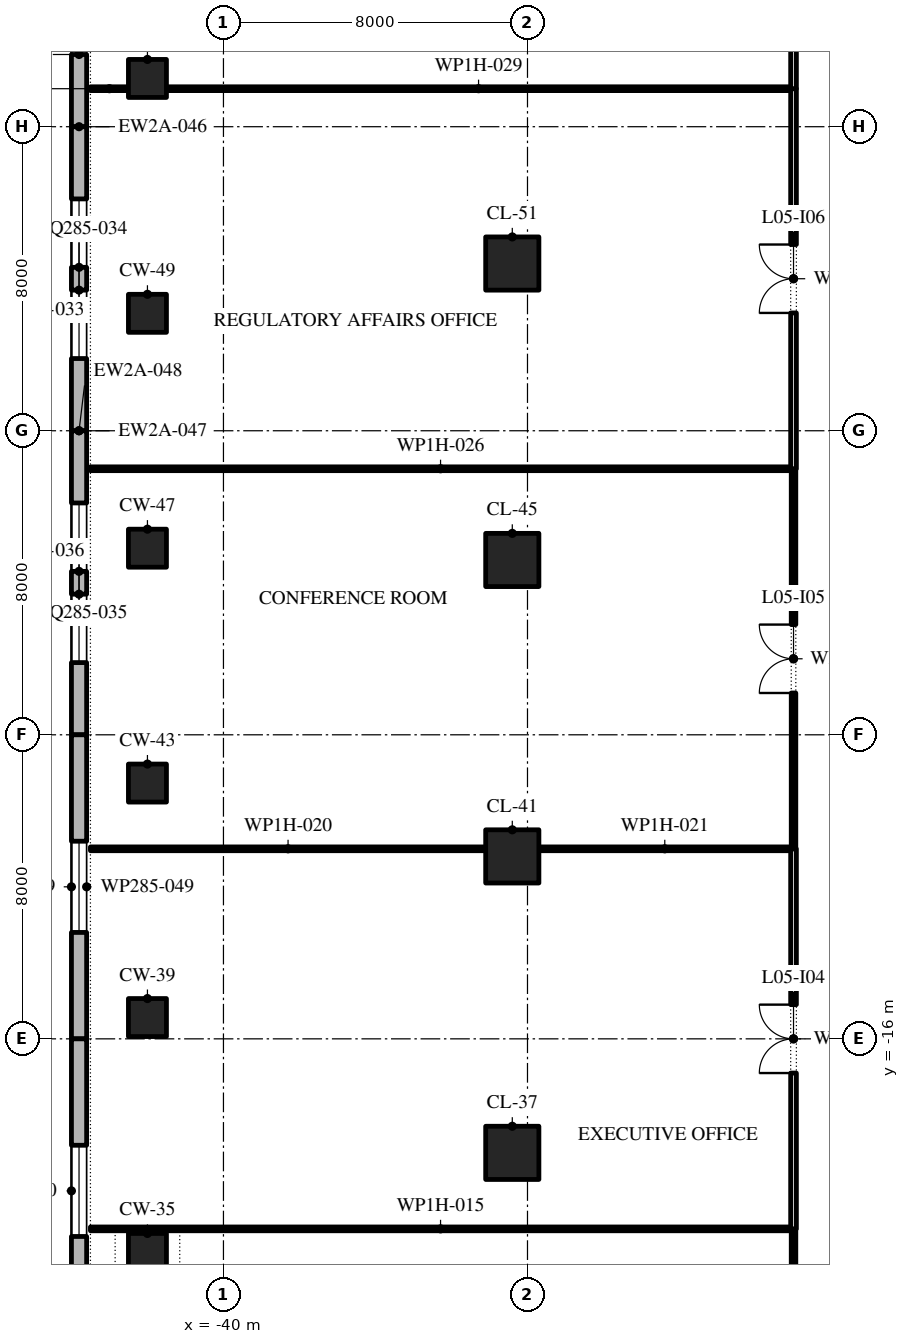
"""IFC4 building model, lengths in metres.
Left out: names, types, materials, properties, quantities, classifications, styles, units other than length and angle.
Written with IfcOpenShell. Run it as: python <this file> out.ifc"""

import sys

from ifc_helpers import new_model, si_unit, direction, frame, frame_2d, origin, origin_2d, place, context, subcontext, project, spatial, polyline, rectangle, outline, extrude, element, fill, save


model = new_model("IFC4")
c1 = context("Model", 3, precision=1e-05, world=origin(), true_north=direction((0.0, 1.0)))
c2 = subcontext(c1, "Body", "Model", "MODEL_VIEW")
j1 = project(units=[si_unit("LENGTHUNIT", "METRE"), si_unit("PLANEANGLEUNIT", "RADIAN")], contexts=[c1])
p1 = place(None, origin())
s1 = spatial("IfcSite", under=j1, at=p1, CompositionType="ELEMENT")
p2 = place(p1, origin())
s2 = spatial("IfcBuilding", under=s1, at=p2, CompositionType="ELEMENT")
p3 = place(p2, frame((0.0, 0.0, 28.8)))
s3 = spatial("IfcBuildingStorey", under=s2, at=p3, CompositionType="ELEMENT", Elevation=28.8)
p4 = place(p3, frame((-42.0, -21.62, 0.0), z_axis=(0.0, 0.0, 1.0), x_axis=(1.0, 0.0, 0.0)))
e1 = element("IfcColumn", 1, at=p4, inside=s3, PredefinedType="COLUMN", context=c2, shape_type="SweptSolid", body=[
    extrude(rectangle(XDim=1.0, YDim=1.0, at=origin_2d()), origin(), (0.0, 0.0, 1.0), 4.35),
])
p5 = place(p3, frame((-32.4, -19.0, 0.0), z_axis=(0.0, 0.0, 1.0), x_axis=(1.0, 0.0, 0.0)))
e2 = element("IfcColumn", 2, at=p5, inside=s3, PredefinedType="COLUMN", context=c2, shape_type="SweptSolid", body=[
    extrude(rectangle(XDim=1.4, YDim=1.4, at=origin_2d()), origin(), (0.0, 0.0, 1.0), 4.8),
])
p6 = place(p3, frame((-42.0, -15.44, 0.0), z_axis=(0.0, 0.0, 1.0), x_axis=(1.0, 0.0, 0.0)))
e3 = element("IfcColumn", 3, at=p6, inside=s3, PredefinedType="COLUMN", context=c2, shape_type="SweptSolid", body=[
    extrude(rectangle(XDim=1.0, YDim=1.0, at=origin_2d()), origin(), (0.0, 0.0, 1.0), 4.35),
])
p7 = place(p3, frame((-32.4, -11.2, 0.0), z_axis=(0.0, 0.0, 1.0), x_axis=(1.0, 0.0, 0.0)))
e4 = element("IfcColumn", 4, at=p7, inside=s3, PredefinedType="COLUMN", context=c2, shape_type="SweptSolid", body=[
    extrude(rectangle(XDim=1.4, YDim=1.4, at=origin_2d()), origin(), (0.0, 0.0, 1.0), 4.8),
])
p8 = place(p3, frame((-42.0, -9.27, 0.0), z_axis=(0.0, 0.0, 1.0), x_axis=(1.0, 0.0, 0.0)))
e5 = element("IfcColumn", 5, at=p8, inside=s3, PredefinedType="COLUMN", context=c2, shape_type="SweptSolid", body=[
    extrude(rectangle(XDim=1.0, YDim=1.0, at=origin_2d()), origin(), (0.0, 0.0, 1.0), 4.35),
])
p9 = place(p3, frame((-32.4, -3.4, 0.0), z_axis=(0.0, 0.0, 1.0), x_axis=(1.0, 0.0, 0.0)))
e6 = element("IfcColumn", 6, at=p9, inside=s3, PredefinedType="COLUMN", context=c2, shape_type="SweptSolid", body=[
    extrude(rectangle(XDim=1.4, YDim=1.4, at=origin_2d()), origin(), (0.0, 0.0, 1.0), 4.8),
])
for number, where, z_axis, x_axis in (
    (7, (-42.0, -3.09, 0.0), (0.0, 0.0, 1.0), (1.0, 0.0, 0.0)),
    (8, (-42.0, 3.09, 0.0), (0.0, 0.0, 1.0), (1.0, 0.0, 0.0)),
):
    element("IfcColumn", number, at=place(p3, frame(where, z_axis=z_axis, x_axis=x_axis)), inside=s3, PredefinedType="COLUMN", context=c2, shape_type="SweptSolid", body=[
        extrude(rectangle(XDim=1.0, YDim=1.0, at=origin_2d()), origin(), (0.0, 0.0, 1.0), 4.35),
    ])
p10 = place(p3, frame((-32.4, 4.4, 0.0), z_axis=(0.0, 0.0, 1.0), x_axis=(1.0, 0.0, 0.0)))
e9 = element("IfcColumn", 9, at=p10, inside=s3, PredefinedType="COLUMN", context=c2, shape_type="SweptSolid", body=[
    extrude(rectangle(XDim=1.4, YDim=1.4, at=origin_2d()), origin(), (0.0, 0.0, 1.0), 4.8),
])
p11 = place(p3, frame((-42.0, 9.27, 0.0), z_axis=(0.0, 0.0, 1.0), x_axis=(1.0, 0.0, 0.0)))
e10 = element("IfcColumn", 10, at=p11, inside=s3, PredefinedType="COLUMN", context=c2, shape_type="SweptSolid", body=[
    extrude(rectangle(XDim=1.0, YDim=1.0, at=origin_2d()), origin(), (0.0, 0.0, 1.0), 4.35),
])
p12 = place(p3, frame((-43.8, 16.0, 0.0), z_axis=(0.0, 0.0, 1.0), x_axis=(0.0, -1.0, 0.0)))
e11 = element("IfcWall", 11, at=p12, inside=s3, PredefinedType="STANDARD", context=c2, shape_type="SweptSolid", body=[
    extrude(rectangle(XDim=8.0, YDim=0.4, at=frame_2d((4.0, 0.0))), origin(), (0.0, 0.0, 1.0), 4.35),
])
p13 = place(p12, frame((1.9, 0.0, 0.9)))
e12 = element("IfcOpeningElement", 12, at=p13, cuts=e11, PredefinedType="OPENING", context=c2, shape_type="SweptSolid", body=[
    extrude(outline(polyline([(0.0, 0.0), (1.8, 0.0), (1.8, 1.425), (1.784, 1.646), (1.738, 1.864), (1.661, 2.072), (1.556, 2.268), (1.425, 2.447), (1.269, 2.605), (1.093, 2.741), (0.9, 2.85), (0.707, 2.741), (0.531, 2.605), (0.375, 2.447), (0.244, 2.268), (0.139, 2.072), (0.062, 1.864), (0.016, 1.646), (0.0, 1.425), (0.0, 0.0)])), frame((0.0, 0.21, 0.0), z_axis=(0.0, -1.0, 0.0), x_axis=(1.0, 0.0, 0.0)), (0.0, 0.0, 1.0), 0.42),
])
p14 = place(p12, frame((4.3, 0.0, 0.9)))
e13 = element("IfcOpeningElement", 13, at=p14, cuts=e11, PredefinedType="OPENING", context=c2, shape_type="SweptSolid", body=[
    extrude(outline(polyline([(0.0, 0.0), (1.8, 0.0), (1.8, 1.425), (1.784, 1.646), (1.738, 1.864), (1.661, 2.072), (1.556, 2.268), (1.425, 2.447), (1.269, 2.605), (1.093, 2.741), (0.9, 2.85), (0.707, 2.741), (0.531, 2.605), (0.375, 2.447), (0.244, 2.268), (0.139, 2.072), (0.062, 1.864), (0.016, 1.646), (0.0, 1.425), (0.0, 0.0)])), frame((0.0, 0.21, 0.0), z_axis=(0.0, -1.0, 0.0), x_axis=(1.0, 0.0, 0.0)), (0.0, 0.0, 1.0), 0.42),
])
p15 = place(p3, frame((-43.8, 8.0, 0.0), z_axis=(0.0, 0.0, 1.0), x_axis=(0.0, -1.0, 0.0)))
e14 = element("IfcWall", 14, at=p15, inside=s3, PredefinedType="STANDARD", context=c2, shape_type="SweptSolid", body=[
    extrude(rectangle(XDim=8.0, YDim=0.4, at=frame_2d((4.0, 0.0))), origin(), (0.0, 0.0, 1.0), 4.35),
])
p16 = place(p15, frame((1.9, 0.0, 0.9)))
e15 = element("IfcOpeningElement", 15, at=p16, cuts=e14, PredefinedType="OPENING", context=c2, shape_type="SweptSolid", body=[
    extrude(outline(polyline([(0.0, 0.0), (1.8, 0.0), (1.8, 1.425), (1.784, 1.646), (1.738, 1.864), (1.661, 2.072), (1.556, 2.268), (1.425, 2.447), (1.269, 2.605), (1.093, 2.741), (0.9, 2.85), (0.707, 2.741), (0.531, 2.605), (0.375, 2.447), (0.244, 2.268), (0.139, 2.072), (0.062, 1.864), (0.016, 1.646), (0.0, 1.425), (0.0, 0.0)])), frame((0.0, 0.21, 0.0), z_axis=(0.0, -1.0, 0.0), x_axis=(1.0, 0.0, 0.0)), (0.0, 0.0, 1.0), 0.42),
])
p17 = place(p15, frame((4.3, 0.0, 0.9)))
e16 = element("IfcOpeningElement", 16, at=p17, cuts=e14, PredefinedType="OPENING", context=c2, shape_type="SweptSolid", body=[
    extrude(outline(polyline([(0.0, 0.0), (1.8, 0.0), (1.8, 1.425), (1.784, 1.646), (1.738, 1.864), (1.661, 2.072), (1.556, 2.268), (1.425, 2.447), (1.269, 2.605), (1.093, 2.741), (0.9, 2.85), (0.707, 2.741), (0.531, 2.605), (0.375, 2.447), (0.244, 2.268), (0.139, 2.072), (0.062, 1.864), (0.016, 1.646), (0.0, 1.425), (0.0, 0.0)])), frame((0.0, 0.21, 0.0), z_axis=(0.0, -1.0, 0.0), x_axis=(1.0, 0.0, 0.0)), (0.0, 0.0, 1.0), 0.42),
])
p18 = place(p3, frame((-43.8, 0.0, 0.0), z_axis=(0.0, 0.0, 1.0), x_axis=(0.0, -1.0, 0.0)))
e17 = element("IfcWall", 17, at=p18, inside=s3, PredefinedType="STANDARD", context=c2, shape_type="SweptSolid", body=[
    extrude(rectangle(XDim=8.0, YDim=0.4, at=frame_2d((4.0, 0.0))), origin(), (0.0, 0.0, 1.0), 4.35),
])
p19 = place(p18, frame((1.9, 0.0, 0.9)))
e18 = element("IfcOpeningElement", 18, at=p19, cuts=e17, PredefinedType="OPENING", context=c2, shape_type="SweptSolid", body=[
    extrude(outline(polyline([(0.0, 0.0), (1.8, 0.0), (1.8, 1.425), (1.784, 1.646), (1.738, 1.864), (1.661, 2.072), (1.556, 2.268), (1.425, 2.447), (1.269, 2.605), (1.093, 2.741), (0.9, 2.85), (0.707, 2.741), (0.531, 2.605), (0.375, 2.447), (0.244, 2.268), (0.139, 2.072), (0.062, 1.864), (0.016, 1.646), (0.0, 1.425), (0.0, 0.0)])), frame((0.0, 0.21, 0.0), z_axis=(0.0, -1.0, 0.0), x_axis=(1.0, 0.0, 0.0)), (0.0, 0.0, 1.0), 0.42),
])
p20 = place(p18, frame((4.3, 0.0, 0.9)))
e19 = element("IfcOpeningElement", 19, at=p20, cuts=e17, PredefinedType="OPENING", context=c2, shape_type="SweptSolid", body=[
    extrude(outline(polyline([(0.0, 0.0), (1.8, 0.0), (1.8, 1.425), (1.784, 1.646), (1.738, 1.864), (1.661, 2.072), (1.556, 2.268), (1.425, 2.447), (1.269, 2.605), (1.093, 2.741), (0.9, 2.85), (0.707, 2.741), (0.531, 2.605), (0.375, 2.447), (0.244, 2.268), (0.139, 2.072), (0.062, 1.864), (0.016, 1.646), (0.0, 1.425), (0.0, 0.0)])), frame((0.0, 0.21, 0.0), z_axis=(0.0, -1.0, 0.0), x_axis=(1.0, 0.0, 0.0)), (0.0, 0.0, 1.0), 0.42),
])
p21 = place(p3, frame((-43.8, -8.0, 0.0), z_axis=(0.0, 0.0, 1.0), x_axis=(0.0, -1.0, 0.0)))
e20 = element("IfcWall", 20, at=p21, inside=s3, PredefinedType="STANDARD", context=c2, shape_type="SweptSolid", body=[
    extrude(rectangle(XDim=8.0, YDim=0.4, at=frame_2d((4.0, 0.0))), origin(), (0.0, 0.0, 1.0), 4.35),
])
p22 = place(p21, frame((2.8, 0.0, 0.9)))
e21 = element("IfcOpeningElement", 21, at=p22, cuts=e20, PredefinedType="OPENING", context=c2, shape_type="SweptSolid", body=[
    extrude(outline(polyline([(0.0, 0.0), (2.4, 0.0), (2.4, 1.425), (2.378, 1.677), (2.312, 1.921), (2.205, 2.15), (2.06, 2.356), (1.881, 2.535), (1.674, 2.679), (1.444, 2.785), (1.2, 2.85), (0.956, 2.785), (0.726, 2.679), (0.519, 2.535), (0.34, 2.356), (0.195, 2.15), (0.088, 1.921), (0.022, 1.677), (0.0, 1.425), (0.0, 0.0)])), frame((0.0, 0.21, 0.0), z_axis=(0.0, -1.0, 0.0), x_axis=(1.0, 0.0, 0.0)), (0.0, 0.0, 1.0), 0.42),
])
p23 = place(p3, frame((-43.8, -16.0, 0.0), z_axis=(0.0, 0.0, 1.0), x_axis=(0.0, -1.0, 0.0)))
e22 = element("IfcWall", 22, at=p23, inside=s3, PredefinedType="STANDARD", context=c2, shape_type="SweptSolid", body=[
    extrude(rectangle(XDim=8.0, YDim=0.4, at=frame_2d((4.0, 0.0))), origin(), (0.0, 0.0, 1.0), 4.35),
])
p24 = place(p23, frame((2.8, 0.0, 0.9)))
e23 = element("IfcOpeningElement", 23, at=p24, cuts=e22, PredefinedType="OPENING", context=c2, shape_type="SweptSolid", body=[
    extrude(outline(polyline([(0.0, 0.0), (2.4, 0.0), (2.4, 1.425), (2.378, 1.677), (2.312, 1.921), (2.205, 2.15), (2.06, 2.356), (1.881, 2.535), (1.674, 2.679), (1.444, 2.785), (1.2, 2.85), (0.956, 2.785), (0.726, 2.679), (0.519, 2.535), (0.34, 2.356), (0.195, 2.15), (0.088, 1.921), (0.022, 1.677), (0.0, 1.425), (0.0, 0.0)])), frame((0.0, 0.21, 0.0), z_axis=(0.0, -1.0, 0.0), x_axis=(1.0, 0.0, 0.0)), (0.0, 0.0, 1.0), 0.42),
])
p25 = place(p3, frame((-43.5, -21.0, 0.0), z_axis=(0.0, 0.0, 1.0), x_axis=(1.0, 0.0, 0.0)))
e24 = element("IfcWall", 24, at=p25, inside=s3, PredefinedType="PARTITIONING", context=c2, shape_type="SweptSolid", body=[
    extrude(rectangle(XDim=18.425, YDim=0.1, at=frame_2d((9.212, 0.0))), origin(), (0.0, 0.0, 1.0), 4.35),
])
p26 = place(p3, frame((-43.5, -11.0, 0.0), z_axis=(0.0, 0.0, 1.0), x_axis=(1.0, 0.0, 0.0)))
e25 = element("IfcWall", 25, at=p26, inside=s3, PredefinedType="PARTITIONING", context=c2, shape_type="SweptSolid", body=[
    extrude(rectangle(XDim=10.4, YDim=0.1, at=frame_2d((5.2, 0.0))), origin(), (0.0, 0.0, 1.0), 4.35),
])
p27 = place(p3, frame((-31.7, -11.0, 0.0), z_axis=(0.0, 0.0, 1.0), x_axis=(1.0, 0.0, 0.0)))
e26 = element("IfcWall", 26, at=p27, inside=s3, PredefinedType="PARTITIONING", context=c2, shape_type="SweptSolid", body=[
    extrude(rectangle(XDim=6.625, YDim=0.1, at=frame_2d((3.312, 0.0))), origin(), (0.0, 0.0, 1.0), 4.35),
])
p28 = place(p3, frame((-43.5, -1.0, 0.0), z_axis=(0.0, 0.0, 1.0), x_axis=(1.0, 0.0, 0.0)))
e27 = element("IfcWall", 27, at=p28, inside=s3, PredefinedType="PARTITIONING", context=c2, shape_type="SweptSolid", body=[
    extrude(rectangle(XDim=18.425, YDim=0.1, at=frame_2d((9.212, 0.0))), origin(), (0.0, 0.0, 1.0), 4.35),
])
p29 = place(p3, frame((-43.5, 9.0, 0.0), z_axis=(0.0, 0.0, 1.0), x_axis=(1.0, 0.0, 0.0)))
e28 = element("IfcWall", 28, at=p29, inside=s3, PredefinedType="PARTITIONING", context=c2, shape_type="SweptSolid", body=[
    extrude(rectangle(XDim=1.0, YDim=0.1, at=frame_2d((0.5, 0.0))), origin(), (0.0, 0.0, 1.0), 4.35),
])
p30 = place(p3, frame((-41.5, 9.0, 0.0), z_axis=(0.0, 0.0, 1.0), x_axis=(1.0, 0.0, 0.0)))
e29 = element("IfcWall", 29, at=p30, inside=s3, PredefinedType="PARTITIONING", context=c2, shape_type="SweptSolid", body=[
    extrude(rectangle(XDim=16.425, YDim=0.1, at=frame_2d((8.212, 0.0))), origin(), (0.0, 0.0, 1.0), 4.35),
])
p31 = place(p3, frame((-25.0, -28.56, 0.0), z_axis=(0.0, 0.0, 1.0), x_axis=(0.0, 1.0, 0.0)))
e30 = element("IfcWall", 30, at=p31, inside=s3, PredefinedType="PARTITIONING", context=c2, shape_type="SweptSolid", body=[
    extrude(rectangle(XDim=7.56, YDim=0.12, at=frame_2d((3.78, 0.0))), origin(), (0.0, 0.0, 1.0), 4.35),
])
p32 = place(p31, frame((3.28, 0.0, 0.0)))
e31 = element("IfcOpeningElement", 31, at=p32, cuts=e30, PredefinedType="OPENING", context=c2, shape_type="SweptSolid", body=[
    extrude(rectangle(XDim=1.0, YDim=2.1, at=frame_2d((0.5, 1.05))), frame((0.0, 0.07, 0.0), z_axis=(0.0, -1.0, 0.0), x_axis=(1.0, 0.0, 0.0)), (0.0, 0.0, 1.0), 0.14),
])
p33 = place(p3, frame((-25.0, -21.0, 0.0), z_axis=(0.0, 0.0, 1.0), x_axis=(0.0, 1.0, 0.0)))
e32 = element("IfcWall", 32, at=p33, inside=s3, PredefinedType="PARTITIONING", context=c2, shape_type="SweptSolid", body=[
    extrude(rectangle(XDim=10.0, YDim=0.15, at=frame_2d((5.0, 0.0))), origin(), (0.0, 0.0, 1.0), 4.35),
])
p34 = place(p33, frame((4.1, 0.0, 0.0)))
e33 = element("IfcOpeningElement", 33, at=p34, cuts=e32, PredefinedType="OPENING", context=c2, shape_type="SweptSolid", body=[
    extrude(rectangle(XDim=1.8, YDim=2.1, at=frame_2d((0.9, 1.05))), frame((0.0, 0.085, 0.0), z_axis=(0.0, -1.0, 0.0), x_axis=(1.0, 0.0, 0.0)), (0.0, 0.0, 1.0), 0.17),
])
p35 = place(p3, frame((-25.0, -11.0, 0.0), z_axis=(0.0, 0.0, 1.0), x_axis=(0.0, 1.0, 0.0)))
e34 = element("IfcWall", 34, at=p35, inside=s3, PredefinedType="PARTITIONING", context=c2, shape_type="SweptSolid", body=[
    extrude(rectangle(XDim=10.0, YDim=0.12, at=frame_2d((5.0, 0.0))), origin(), (0.0, 0.0, 1.0), 4.35),
])
p36 = place(p35, frame((4.1, 0.0, 0.0)))
e35 = element("IfcOpeningElement", 35, at=p36, cuts=e34, PredefinedType="OPENING", context=c2, shape_type="SweptSolid", body=[
    extrude(rectangle(XDim=1.8, YDim=2.1, at=frame_2d((0.9, 1.05))), frame((0.0, 0.07, 0.0), z_axis=(0.0, -1.0, 0.0), x_axis=(1.0, 0.0, 0.0)), (0.0, 0.0, 1.0), 0.14),
])
p37 = place(p3, frame((-25.0, -1.0, 0.0), z_axis=(0.0, 0.0, 1.0), x_axis=(0.0, 1.0, 0.0)))
e36 = element("IfcWall", 36, at=p37, inside=s3, PredefinedType="PARTITIONING", context=c2, shape_type="SweptSolid", body=[
    extrude(rectangle(XDim=10.0, YDim=0.15, at=frame_2d((5.0, 0.0))), origin(), (0.0, 0.0, 1.0), 4.35),
])
p38 = place(p37, frame((4.1, 0.0, 0.0)))
e37 = element("IfcOpeningElement", 37, at=p38, cuts=e36, PredefinedType="OPENING", context=c2, shape_type="SweptSolid", body=[
    extrude(rectangle(XDim=1.8, YDim=2.1, at=frame_2d((0.9, 1.05))), frame((0.0, 0.085, 0.0), z_axis=(0.0, -1.0, 0.0), x_axis=(1.0, 0.0, 0.0)), (0.0, 0.0, 1.0), 0.17),
])
p39 = place(p3, frame((-25.0, 9.0, 0.0), z_axis=(0.0, 0.0, 1.0), x_axis=(0.0, 1.0, 0.0)))
e38 = element("IfcWall", 38, at=p39, inside=s3, PredefinedType="PARTITIONING", context=c2, shape_type="SweptSolid", body=[
    extrude(rectangle(XDim=9.0, YDim=0.15, at=frame_2d((4.5, 0.0))), origin(), (0.0, 0.0, 1.0), 4.35),
])
p40 = place(p39, frame((3.6, 0.0, 0.0)))
e39 = element("IfcOpeningElement", 39, at=p40, cuts=e38, PredefinedType="OPENING", context=c2, shape_type="SweptSolid", body=[
    extrude(rectangle(XDim=1.8, YDim=2.1, at=frame_2d((0.9, 1.05))), frame((0.0, 0.085, 0.0), z_axis=(0.0, -1.0, 0.0), x_axis=(1.0, 0.0, 0.0)), (0.0, 0.0, 1.0), 0.17),
])
p41 = place(p14, origin())
e40 = element("IfcWindow", 40, at=p41, inside=s3, PartitioningType="DOUBLE_PANEL_VERTICAL", PredefinedType="WINDOW", context=c2, shape_type="SweptSolid", body=[
    extrude(outline(polyline([(0.0, 0.0), (1.8, 0.0), (1.8, 1.425), (1.784, 1.646), (1.738, 1.864), (1.661, 2.072), (1.556, 2.268), (1.425, 2.447), (1.269, 2.605), (1.093, 2.741), (0.9, 2.85), (0.707, 2.741), (0.531, 2.605), (0.375, 2.447), (0.244, 2.268), (0.139, 2.072), (0.062, 1.864), (0.016, 1.646), (0.0, 1.425), (0.0, 0.0)])), frame((0.0, 0.03, 0.0), z_axis=(0.0, -1.0, 0.0), x_axis=(1.0, 0.0, 0.0)), (0.0, 0.0, 1.0), 0.06),
])
fill(e13, e40)
p42 = place(p16, origin())
e41 = element("IfcWindow", 41, at=p42, inside=s3, PartitioningType="DOUBLE_PANEL_VERTICAL", PredefinedType="WINDOW", context=c2, shape_type="SweptSolid", body=[
    extrude(outline(polyline([(0.0, 0.0), (1.8, 0.0), (1.8, 1.425), (1.784, 1.646), (1.738, 1.864), (1.661, 2.072), (1.556, 2.268), (1.425, 2.447), (1.269, 2.605), (1.093, 2.741), (0.9, 2.85), (0.707, 2.741), (0.531, 2.605), (0.375, 2.447), (0.244, 2.268), (0.139, 2.072), (0.062, 1.864), (0.016, 1.646), (0.0, 1.425), (0.0, 0.0)])), frame((0.0, 0.03, 0.0), z_axis=(0.0, -1.0, 0.0), x_axis=(1.0, 0.0, 0.0)), (0.0, 0.0, 1.0), 0.06),
])
fill(e15, e41)
p43 = place(p17, origin())
e42 = element("IfcWindow", 42, at=p43, inside=s3, PartitioningType="DOUBLE_PANEL_VERTICAL", PredefinedType="WINDOW", context=c2, shape_type="SweptSolid", body=[
    extrude(outline(polyline([(0.0, 0.0), (1.8, 0.0), (1.8, 1.425), (1.784, 1.646), (1.738, 1.864), (1.661, 2.072), (1.556, 2.268), (1.425, 2.447), (1.269, 2.605), (1.093, 2.741), (0.9, 2.85), (0.707, 2.741), (0.531, 2.605), (0.375, 2.447), (0.244, 2.268), (0.139, 2.072), (0.062, 1.864), (0.016, 1.646), (0.0, 1.425), (0.0, 0.0)])), frame((0.0, 0.03, 0.0), z_axis=(0.0, -1.0, 0.0), x_axis=(1.0, 0.0, 0.0)), (0.0, 0.0, 1.0), 0.06),
])
fill(e16, e42)
p44 = place(p19, origin())
e43 = element("IfcWindow", 43, at=p44, inside=s3, PartitioningType="DOUBLE_PANEL_VERTICAL", PredefinedType="WINDOW", context=c2, shape_type="SweptSolid", body=[
    extrude(outline(polyline([(0.0, 0.0), (1.8, 0.0), (1.8, 1.425), (1.784, 1.646), (1.738, 1.864), (1.661, 2.072), (1.556, 2.268), (1.425, 2.447), (1.269, 2.605), (1.093, 2.741), (0.9, 2.85), (0.707, 2.741), (0.531, 2.605), (0.375, 2.447), (0.244, 2.268), (0.139, 2.072), (0.062, 1.864), (0.016, 1.646), (0.0, 1.425), (0.0, 0.0)])), frame((0.0, 0.03, 0.0), z_axis=(0.0, -1.0, 0.0), x_axis=(1.0, 0.0, 0.0)), (0.0, 0.0, 1.0), 0.06),
])
fill(e18, e43)
p45 = place(p20, origin())
e44 = element("IfcWindow", 44, at=p45, inside=s3, PartitioningType="DOUBLE_PANEL_VERTICAL", PredefinedType="WINDOW", context=c2, shape_type="SweptSolid", body=[
    extrude(outline(polyline([(0.0, 0.0), (1.8, 0.0), (1.8, 1.425), (1.784, 1.646), (1.738, 1.864), (1.661, 2.072), (1.556, 2.268), (1.425, 2.447), (1.269, 2.605), (1.093, 2.741), (0.9, 2.85), (0.707, 2.741), (0.531, 2.605), (0.375, 2.447), (0.244, 2.268), (0.139, 2.072), (0.062, 1.864), (0.016, 1.646), (0.0, 1.425), (0.0, 0.0)])), frame((0.0, 0.03, 0.0), z_axis=(0.0, -1.0, 0.0), x_axis=(1.0, 0.0, 0.0)), (0.0, 0.0, 1.0), 0.06),
])
fill(e19, e44)
p46 = place(p22, origin())
e45 = element("IfcWindow", 45, at=p46, inside=s3, PartitioningType="DOUBLE_PANEL_VERTICAL", PredefinedType="WINDOW", context=c2, shape_type="SweptSolid", body=[
    extrude(outline(polyline([(0.0, 0.0), (2.4, 0.0), (2.4, 1.425), (2.378, 1.677), (2.312, 1.921), (2.205, 2.15), (2.06, 2.356), (1.881, 2.535), (1.674, 2.679), (1.444, 2.785), (1.2, 2.85), (0.956, 2.785), (0.726, 2.679), (0.519, 2.535), (0.34, 2.356), (0.195, 2.15), (0.088, 1.921), (0.022, 1.677), (0.0, 1.425), (0.0, 0.0)])), frame((0.0, 0.03, 0.0), z_axis=(0.0, -1.0, 0.0), x_axis=(1.0, 0.0, 0.0)), (0.0, 0.0, 1.0), 0.06),
])
fill(e21, e45)
p47 = place(p24, origin())
e46 = element("IfcWindow", 46, at=p47, inside=s3, PartitioningType="DOUBLE_PANEL_VERTICAL", PredefinedType="WINDOW", context=c2, shape_type="SweptSolid", body=[
    extrude(outline(polyline([(0.0, 0.0), (2.4, 0.0), (2.4, 1.425), (2.378, 1.677), (2.312, 1.921), (2.205, 2.15), (2.06, 2.356), (1.881, 2.535), (1.674, 2.679), (1.444, 2.785), (1.2, 2.85), (0.956, 2.785), (0.726, 2.679), (0.519, 2.535), (0.34, 2.356), (0.195, 2.15), (0.088, 1.921), (0.022, 1.677), (0.0, 1.425), (0.0, 0.0)])), frame((0.0, 0.03, 0.0), z_axis=(0.0, -1.0, 0.0), x_axis=(1.0, 0.0, 0.0)), (0.0, 0.0, 1.0), 0.06),
])
fill(e23, e46)
p48 = place(p34, origin())
e47 = element("IfcDoor", 47, at=p48, inside=s3, OperationType="SINGLE_SWING_RIGHT", PredefinedType="DOOR", context=c2, shape_type="SweptSolid", body=[
    extrude(rectangle(XDim=1.8, YDim=2.1, at=frame_2d((0.9, 1.05))), frame((0.0, 0.025, 0.0), z_axis=(0.0, -1.0, 0.0), x_axis=(1.0, 0.0, 0.0)), (0.0, 0.0, 1.0), 0.05),
])
fill(e33, e47)
p49 = place(p36, origin())
e48 = element("IfcDoor", 48, at=p49, inside=s3, OperationType="SINGLE_SWING_RIGHT", PredefinedType="DOOR", context=c2, shape_type="SweptSolid", body=[
    extrude(rectangle(XDim=1.8, YDim=2.1, at=frame_2d((0.9, 1.05))), frame((0.0, 0.025, 0.0), z_axis=(0.0, -1.0, 0.0), x_axis=(1.0, 0.0, 0.0)), (0.0, 0.0, 1.0), 0.05),
])
fill(e35, e48)
p50 = place(p38, origin())
e49 = element("IfcDoor", 49, at=p50, inside=s3, OperationType="SINGLE_SWING_RIGHT", PredefinedType="DOOR", context=c2, shape_type="SweptSolid", body=[
    extrude(rectangle(XDim=1.8, YDim=2.1, at=frame_2d((0.9, 1.05))), frame((0.0, 0.025, 0.0), z_axis=(0.0, -1.0, 0.0), x_axis=(1.0, 0.0, 0.0)), (0.0, 0.0, 1.0), 0.05),
])
fill(e37, e49)
save(model, sys.argv[1])
